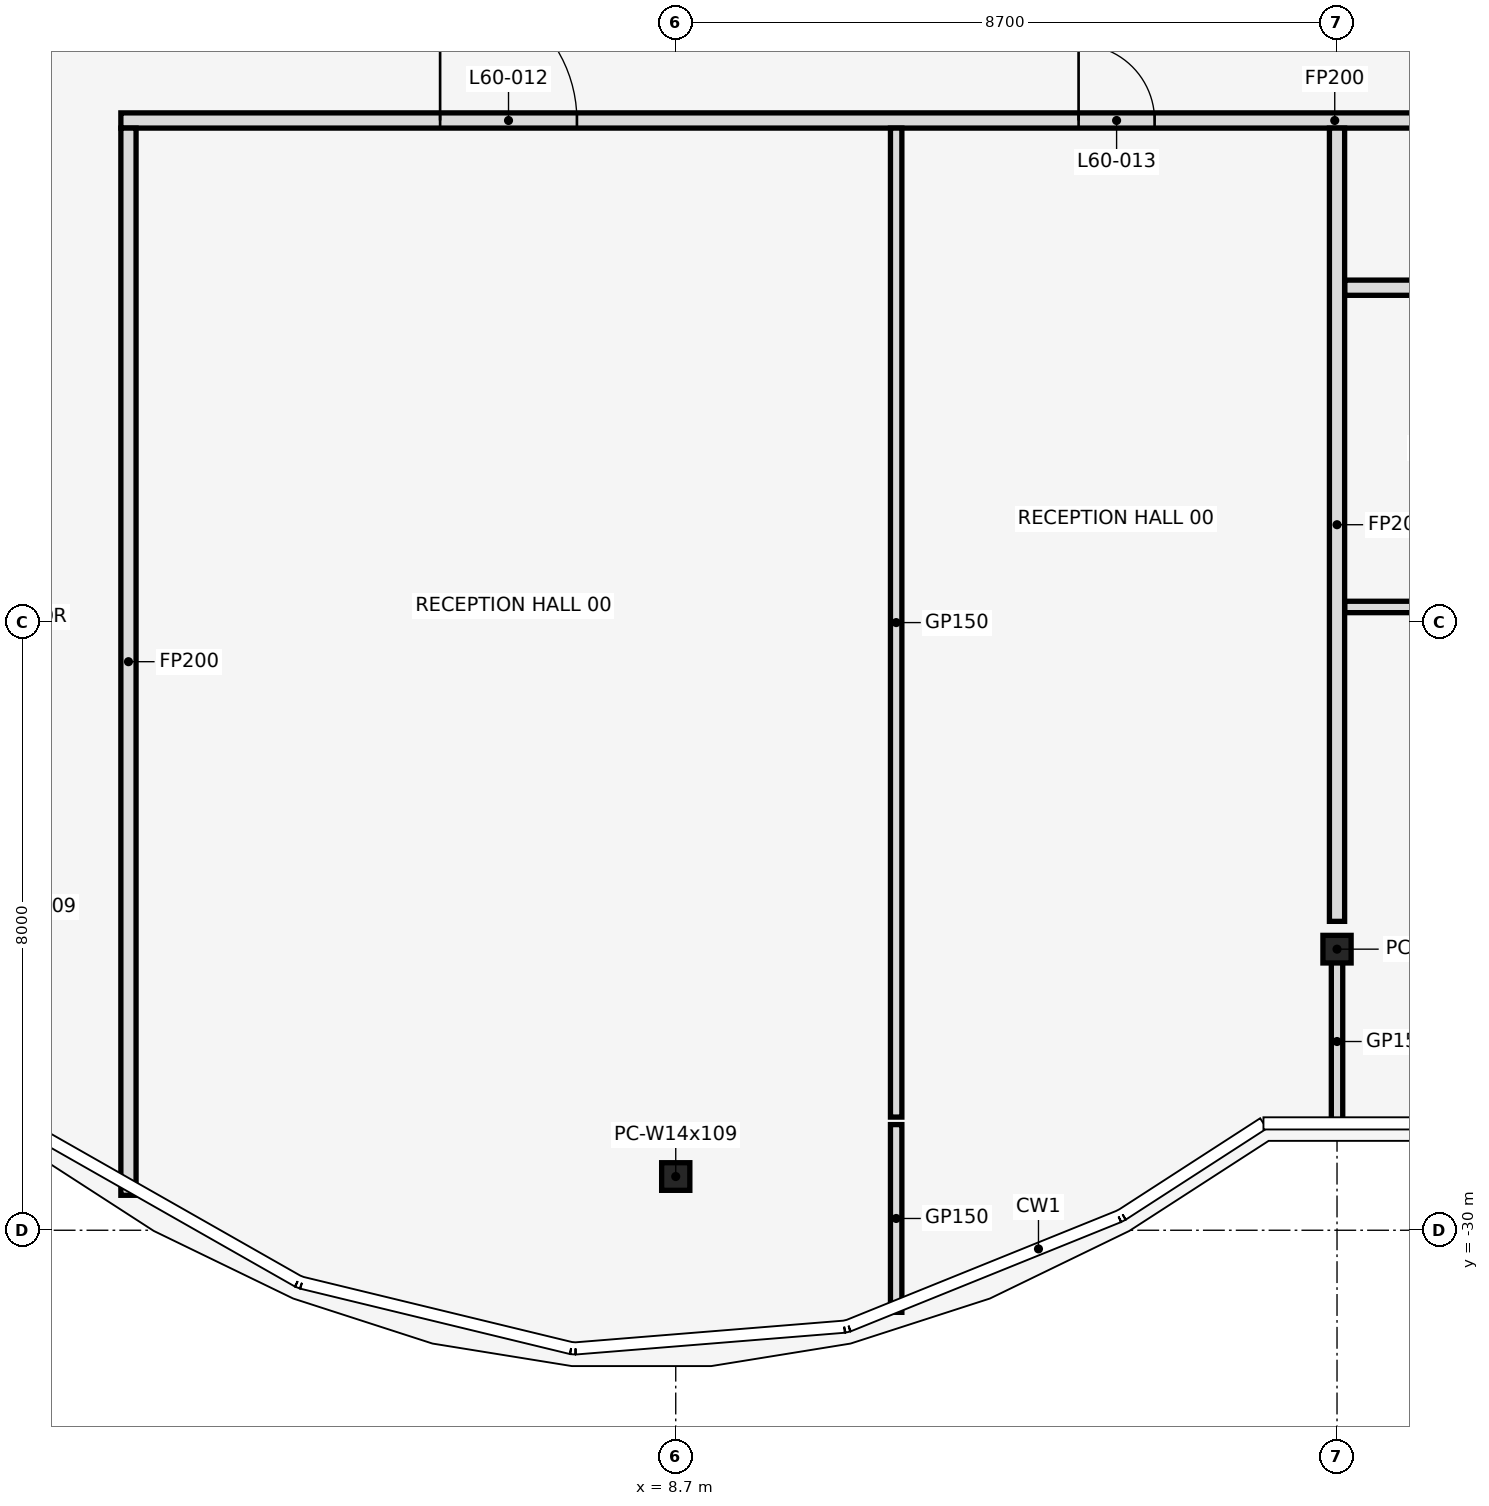
"""IFC4 building model, lengths in metres.
Left out: names, types, materials, properties, quantities, classifications, styles, units other than length and angle.
Written with IfcOpenShell. Run it as: python <this file> out.ifc"""

import sys

from ifc_helpers import new_model, si_unit, direction, frame, frame_2d, origin, origin_2d, place, context, subcontext, project, spatial, rectangle, i_section, extrude, element, fill, save


model = new_model("IFC4")
c1 = context("Model", 3, precision=1e-05, world=origin(), true_north=direction((0.0, 1.0)))
c2 = subcontext(c1, "Body", "Model", "MODEL_VIEW")
j1 = project(units=[si_unit("LENGTHUNIT", "METRE"), si_unit("PLANEANGLEUNIT", "RADIAN")], contexts=[c1])
p1 = place(None, origin())
s1 = spatial("IfcSite", under=j1, at=p1, CompositionType="ELEMENT")
p2 = place(p1, origin())
s2 = spatial("IfcBuilding", under=s1, at=p2, CompositionType="ELEMENT")
p3 = place(p2, frame((0.0, 0.0, 266.6)))
s3 = spatial("IfcBuildingStorey", under=s2, at=p3, CompositionType="ELEMENT", Elevation=266.6)
for number, where, z_axis, x_axis in (
    (1, (8.7, -29.293, 0.0), (0.0, 0.0, 1.0), (1.0, 0.0, 0.0)),
    (2, (17.4, -26.302, 0.0), (0.0, 0.0, 1.0), (1.0, 0.0, 0.0)),
):
    element("IfcColumn", number, at=place(p3, frame(where, z_axis=z_axis, x_axis=x_axis)), inside=s3, PredefinedType="COLUMN", context=c2, shape_type="SweptSolid", body=[
        extrude(i_section(OverallWidth=0.371, OverallDepth=0.363, WebThickness=0.013, FlangeThickness=0.022, at=origin_2d()), origin(), (0.0, 0.0, 1.0), 4.2),
    ])
p4 = place(p3, frame((17.5, -21.8, 0.0), z_axis=(0.0, 0.0, 1.0), x_axis=(1.0, 0.0, 0.0)))
e3 = element("IfcWall", 3, at=p4, inside=s3, PredefinedType="PARTITIONING", context=c2, shape_type="SweptSolid", body=[
    extrude(rectangle(XDim=8.7, YDim=0.15, at=frame_2d((4.35, 0.0))), origin(), (0.0, 0.0, 1.0), 3.118),
])
p5 = place(p3, frame((17.5, -17.6, 0.0), z_axis=(0.0, 0.0, 1.0), x_axis=(1.0, 0.0, 0.0)))
e4 = element("IfcWall", 4, at=p5, inside=s3, PredefinedType="PARTITIONING", context=c2, shape_type="SweptSolid", body=[
    extrude(rectangle(XDim=8.5, YDim=0.2, at=frame_2d((4.25, 0.0))), origin(), (0.0, 0.0, 1.0), 3.118),
])
p6 = place(p5, frame((1.1, 0.0, 0.0)))
e5 = element("IfcOpeningElement", 5, at=p6, cuts=e4, PredefinedType="OPENING", context=c2, shape_type="SweptSolid", body=[
    extrude(rectangle(XDim=0.9, YDim=2.1, at=frame_2d((0.45, 1.05))), frame((0.0, 0.112, 0.0), z_axis=(0.0, -1.0, 0.0), x_axis=(1.0, 0.0, 0.0)), (0.0, 0.0, 1.0), 0.224),
])
p7 = place(p5, frame((4.3, 0.0, 0.0)))
e6 = element("IfcOpeningElement", 6, at=p7, cuts=e4, PredefinedType="OPENING", context=c2, shape_type="SweptSolid", body=[
    extrude(rectangle(XDim=0.9, YDim=2.1, at=frame_2d((0.45, 1.05))), frame((0.0, 0.112, 0.0), z_axis=(0.0, -1.0, 0.0), x_axis=(1.0, 0.0, 0.0)), (0.0, 0.0, 1.0), 0.224),
])
p8 = place(p5, frame((6.9, 0.0, 0.0)))
e7 = element("IfcOpeningElement", 7, at=p8, cuts=e4, PredefinedType="OPENING", context=c2, shape_type="SweptSolid", body=[
    extrude(rectangle(XDim=1.0, YDim=2.1, at=frame_2d((0.5, 1.05))), frame((0.0, 0.112, 0.0), z_axis=(0.0, -1.0, 0.0), x_axis=(1.0, 0.0, 0.0)), (0.0, 0.0, 1.0), 0.224),
])
p9 = place(p3, frame((1.4, -15.4, 0.0), z_axis=(0.0, 0.0, 1.0), x_axis=(1.0, 0.0, 0.0)))
e8 = element("IfcWall", 8, at=p9, inside=s3, PredefinedType="PARTITIONING", context=c2, shape_type="SweptSolid", body=[
    extrude(rectangle(XDim=31.94, YDim=0.2, at=frame_2d((15.97, 0.0))), origin(), (0.0, 0.0, 1.0), 3.118),
])
p10 = place(p9, frame((4.2, 0.0, 0.0)))
e9 = element("IfcOpeningElement", 9, at=p10, cuts=e8, PredefinedType="OPENING", context=c2, shape_type="SweptSolid", body=[
    extrude(rectangle(XDim=1.8, YDim=2.1, at=frame_2d((0.9, 1.05))), frame((0.0, 0.112, 0.0), z_axis=(0.0, -1.0, 0.0), x_axis=(1.0, 0.0, 0.0)), (0.0, 0.0, 1.0), 0.224),
])
p11 = place(p9, frame((12.6, 0.0, 0.0)))
e10 = element("IfcOpeningElement", 10, at=p11, cuts=e8, PredefinedType="OPENING", context=c2, shape_type="SweptSolid", body=[
    extrude(rectangle(XDim=1.0, YDim=2.1, at=frame_2d((0.5, 1.05))), frame((0.0, 0.112, 0.0), z_axis=(0.0, -1.0, 0.0), x_axis=(1.0, 0.0, 0.0)), (0.0, 0.0, 1.0), 0.224),
])
p12 = place(p9, frame((19.9, 0.0, 0.0)))
e11 = element("IfcOpeningElement", 11, at=p12, cuts=e8, PredefinedType="OPENING", context=c2, shape_type="SweptSolid", body=[
    extrude(rectangle(XDim=0.9, YDim=2.1, at=frame_2d((0.45, 1.05))), frame((0.0, 0.112, 0.0), z_axis=(0.0, -1.0, 0.0), x_axis=(1.0, 0.0, 0.0)), (0.0, 0.0, 1.0), 0.224),
])
p13 = place(p9, frame((27.4, 0.0, 0.0)))
e12 = element("IfcOpeningElement", 12, at=p13, cuts=e8, PredefinedType="OPENING", context=c2, shape_type="SweptSolid", body=[
    extrude(rectangle(XDim=1.8, YDim=2.1, at=frame_2d((0.9, 1.05))), frame((0.0, 0.112, 0.0), z_axis=(0.0, -1.0, 0.0), x_axis=(1.0, 0.0, 0.0)), (0.0, 0.0, 1.0), 0.224),
])
p14 = place(p3, frame((1.5, -29.54, 0.0), z_axis=(0.0, 0.0, 1.0), x_axis=(0.0, 1.0, 0.0)))
e13 = element("IfcWall", 13, at=p14, inside=s3, PredefinedType="PARTITIONING", context=c2, shape_type="SweptSolid", body=[
    extrude(rectangle(XDim=14.04, YDim=0.2, at=frame_2d((7.02, 0.0))), origin(), (0.0, 0.0, 1.0), 3.118),
])
p15 = place(p3, frame((11.6, -31.08, 0.0), z_axis=(0.0, 0.0, 1.0), x_axis=(0.0, 1.0, 0.0)))
e14 = element("IfcWall", 14, at=p15, inside=s3, PredefinedType="PARTITIONING", context=c2, shape_type="SweptSolid", body=[
    extrude(rectangle(XDim=2.47, YDim=0.15, at=frame_2d((1.235, 0.0))), origin(), (0.0, 0.0, 1.0), 3.118),
])
p16 = place(p3, frame((11.6, -28.511, 0.0), z_axis=(0.0, 0.0, 1.0), x_axis=(0.0, 1.0, 0.0)))
e15 = element("IfcWall", 15, at=p16, inside=s3, PredefinedType="PARTITIONING", context=c2, shape_type="SweptSolid", body=[
    extrude(rectangle(XDim=13.011, YDim=0.15, at=frame_2d((6.505, 0.0))), origin(), (0.0, 0.0, 1.0), 3.118),
])
p17 = place(p3, frame((17.4, -28.61, 0.0), z_axis=(0.0, 0.0, 1.0), x_axis=(0.0, 1.0, 0.0)))
e16 = element("IfcWall", 16, at=p17, inside=s3, PredefinedType="PARTITIONING", context=c2, shape_type="SweptSolid", body=[
    extrude(rectangle(XDim=2.186, YDim=0.15, at=frame_2d((1.093, 0.0))), origin(), (0.0, 0.0, 1.0), 3.118),
])
p18 = place(p3, frame((17.4, -25.936, 0.0), z_axis=(0.0, 0.0, 1.0), x_axis=(0.0, 1.0, 0.0)))
e17 = element("IfcWall", 17, at=p18, inside=s3, PredefinedType="PARTITIONING", context=c2, shape_type="SweptSolid", body=[
    extrude(rectangle(XDim=10.436, YDim=0.2, at=frame_2d((5.218, 0.0))), origin(), (0.0, 0.0, 1.0), 3.118),
])
p19 = place(p10, origin())
e18 = element("IfcDoor", 18, at=p19, inside=s3, OperationType="SINGLE_SWING_LEFT", PredefinedType="DOOR", context=c2, shape_type="SweptSolid", body=[
    extrude(rectangle(XDim=1.8, YDim=2.1, at=frame_2d((0.9, 1.05))), frame((0.0, 0.025, 0.0), z_axis=(0.0, -1.0, 0.0), x_axis=(1.0, 0.0, 0.0)), (0.0, 0.0, 1.0), 0.05),
])
fill(e9, e18)
p20 = place(p11, frame((1.0, 0.0, 0.0), z_axis=(0.0, 0.0, 1.0), x_axis=(-1.0, 0.0, 0.0)))
e19 = element("IfcDoor", 19, at=p20, inside=s3, OperationType="SINGLE_SWING_LEFT", PredefinedType="DOOR", context=c2, shape_type="SweptSolid", body=[
    extrude(rectangle(XDim=1.0, YDim=2.1, at=frame_2d((0.5, 1.05))), frame((0.0, 0.025, 0.0), z_axis=(0.0, -1.0, 0.0), x_axis=(1.0, 0.0, 0.0)), (0.0, 0.0, 1.0), 0.05),
])
fill(e10, e19)
save(model, sys.argv[1])
